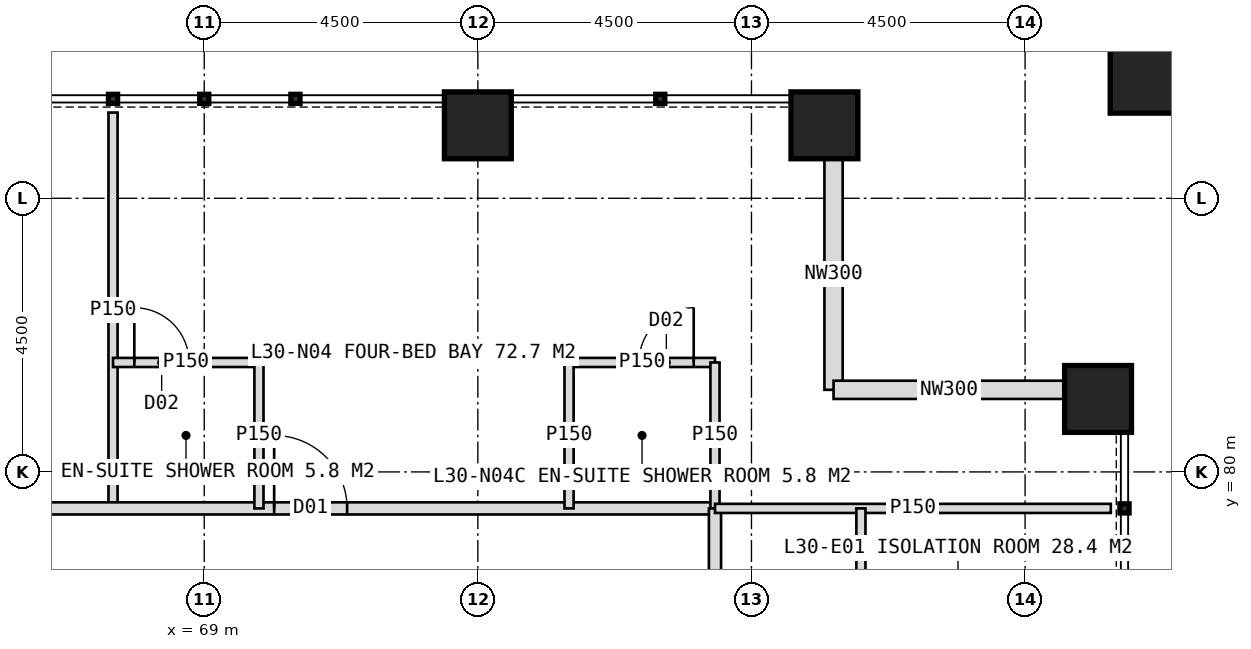
"""IFC4 building model, lengths in metres.
Left out: names, types, materials, properties, quantities, classifications, styles, units other than length and angle.
Written with IfcOpenShell. Run it as: python <this file> out.ifc"""

import sys

from ifc_helpers import new_model, si_unit, direction, frame, frame_2d, origin, origin_2d, place, context, subcontext, project, spatial, rectangle, hollow_rectangle, extrude, element, fill, save


model = new_model("IFC4")
c1 = context("Model", 3, precision=1e-05, world=origin(), true_north=direction((0.0, 1.0)))
c2 = subcontext(c1, "Body", "Model", "MODEL_VIEW")
j1 = project(units=[si_unit("LENGTHUNIT", "METRE"), si_unit("PLANEANGLEUNIT", "RADIAN")], contexts=[c1])
p1 = place(None, origin())
s1 = spatial("IfcSite", under=j1, at=p1, CompositionType="ELEMENT")
p2 = place(p1, origin())
s2 = spatial("IfcBuilding", under=s1, at=p2, CompositionType="ELEMENT")
p3 = place(p2, frame((0.0, 0.0, 128.0)))
s3 = spatial("IfcBuildingStorey", under=s2, at=p3, CompositionType="ELEMENT", Elevation=128.0)
for number, where, z_axis, x_axis in (
    (1, (73.5, 85.7, 0.0), (0.0, 0.0, 1.0), (1.0, 0.0, 0.0)),
    (2, (79.2, 85.7, 0.0), (0.0, 0.0, 1.0), (1.0, 0.0, 0.0)),
    (3, (83.7, 81.2, 0.0), (0.0, 0.0, 1.0), (1.0, 0.0, 0.0)),
):
    element("IfcColumn", number, at=place(p3, frame(where, z_axis=z_axis, x_axis=x_axis)), inside=s3, PredefinedType="COLUMN", context=c2, shape_type="SweptSolid", body=[
        extrude(hollow_rectangle(XDim=1.1, YDim=1.1, WallThickness=0.1, at=origin_2d()), origin(), (0.0, 0.0, 1.0), 4.0),
    ])
p4 = place(p3, frame((84.6, 86.6, 0.0), z_axis=(0.0, 0.0, 1.0), x_axis=(1.0, 0.0, 0.0)))
e4 = element("IfcColumn", 4, at=p4, inside=s3, PredefinedType="COLUMN", context=c2, shape_type="SweptSolid", body=[
    extrude(hollow_rectangle(XDim=1.4, YDim=1.4, WallThickness=0.08, at=origin_2d()), origin(), (0.0, 0.0, 1.0), 4.0),
])
for number, where, z_axis, x_axis in (
    (5, (79.35, 85.15, 0.0), (0.0, 0.0, 1.0), (0.0, -1.0, 0.0)),
    (6, (79.35, 81.35, 0.0), (0.0, 0.0, 1.0), (1.0, 0.0, 0.0)),
):
    element("IfcWall", number, at=place(p3, frame(where, z_axis=z_axis, x_axis=x_axis)), inside=s3, PredefinedType="ELEMENTEDWALL", context=c2, shape_type="SweptSolid", body=[
        extrude(rectangle(XDim=3.8, YDim=0.3, at=frame_2d((1.9, 0.0))), origin(), (0.0, 0.0, 1.0), 4.0),
    ])
p5 = place(p3, frame((67.5, 79.4, 0.0), z_axis=(0.0, 0.0, 1.0), x_axis=(0.0, 1.0, 0.0)))
e7 = element("IfcWall", 7, at=p5, inside=s3, PredefinedType="PARTITIONING", context=c2, shape_type="SweptSolid", body=[
    extrude(rectangle(XDim=6.51, YDim=0.15, at=frame_2d((3.255, 0.0))), origin(), (0.0, 0.0, 1.0), 3.75),
])
p6 = place(p3, frame((42.6, 79.4, 0.0), z_axis=(0.0, 0.0, 1.0), x_axis=(1.0, 0.0, 0.0)))
e8 = element("IfcWall", 8, at=p6, inside=s3, PredefinedType="PARTITIONING", context=c2, shape_type="SweptSolid", body=[
    extrude(rectangle(XDim=34.8, YDim=0.2, at=frame_2d((17.4, 0.0))), origin(), (0.0, 0.0, 1.0), 3.75),
])
p7 = place(p6, frame((2.45, 0.0, 0.0)))
e9 = element("IfcOpeningElement", 9, at=p7, cuts=e8, PredefinedType="OPENING", context=c2, shape_type="SweptSolid", body=[
    extrude(rectangle(XDim=1.2, YDim=2.2, at=frame_2d((0.6, 1.1))), frame((0.0, 0.11, 0.0), z_axis=(0.0, -1.0, 0.0), x_axis=(1.0, 0.0, 0.0)), (0.0, 0.0, 1.0), 0.22),
])
p8 = place(p6, frame((10.15, 0.0, 0.0)))
e10 = element("IfcOpeningElement", 10, at=p8, cuts=e8, PredefinedType="OPENING", context=c2, shape_type="SweptSolid", body=[
    extrude(rectangle(XDim=1.2, YDim=2.2, at=frame_2d((0.6, 1.1))), frame((0.0, 0.11, 0.0), z_axis=(0.0, -1.0, 0.0), x_axis=(1.0, 0.0, 0.0)), (0.0, 0.0, 1.0), 0.22),
])
p9 = place(p6, frame((19.8, 0.0, 0.0)))
e11 = element("IfcOpeningElement", 11, at=p9, cuts=e8, PredefinedType="OPENING", context=c2, shape_type="SweptSolid", body=[
    extrude(rectangle(XDim=1.2, YDim=2.2, at=frame_2d((0.6, 1.1))), frame((0.0, 0.11, 0.0), z_axis=(0.0, -1.0, 0.0), x_axis=(1.0, 0.0, 0.0)), (0.0, 0.0, 1.0), 0.22),
])
p10 = place(p6, frame((27.55, 0.0, 0.0)))
e12 = element("IfcOpeningElement", 12, at=p10, cuts=e8, PredefinedType="OPENING", context=c2, shape_type="SweptSolid", body=[
    extrude(rectangle(XDim=1.2, YDim=2.2, at=frame_2d((0.6, 1.1))), frame((0.0, 0.11, 0.0), z_axis=(0.0, -1.0, 0.0), x_axis=(1.0, 0.0, 0.0)), (0.0, 0.0, 1.0), 0.22),
])
p11 = place(p3, frame((67.5, 81.8, 0.0), z_axis=(0.0, 0.0, 1.0), x_axis=(1.0, 0.0, 0.0)))
e13 = element("IfcWall", 13, at=p11, inside=s3, PredefinedType="PARTITIONING", context=c2, shape_type="SweptSolid", body=[
    extrude(rectangle(XDim=2.4, YDim=0.15, at=frame_2d((1.2, 0.0))), origin(), (0.0, 0.0, 1.0), 3.75),
])
p12 = place(p11, frame((0.35, 0.0, 0.0)))
e14 = element("IfcOpeningElement", 14, at=p12, cuts=e13, PredefinedType="OPENING", context=c2, shape_type="SweptSolid", body=[
    extrude(rectangle(XDim=0.9, YDim=2.1, at=frame_2d((0.45, 1.05))), frame((0.0, 0.085, 0.0), z_axis=(0.0, -1.0, 0.0), x_axis=(1.0, 0.0, 0.0)), (0.0, 0.0, 1.0), 0.17),
])
p13 = place(p3, frame((69.9, 79.4, 0.0), z_axis=(0.0, 0.0, 1.0), x_axis=(0.0, 1.0, 0.0)))
e15 = element("IfcWall", 15, at=p13, inside=s3, PredefinedType="PARTITIONING", context=c2, shape_type="SweptSolid", body=[
    extrude(rectangle(XDim=2.4, YDim=0.15, at=frame_2d((1.2, 0.0))), origin(), (0.0, 0.0, 1.0), 3.75),
])
p14 = place(p3, frame((75.0, 81.8, 0.0), z_axis=(0.0, 0.0, 1.0), x_axis=(1.0, 0.0, 0.0)))
e16 = element("IfcWall", 16, at=p14, inside=s3, PredefinedType="PARTITIONING", context=c2, shape_type="SweptSolid", body=[
    extrude(rectangle(XDim=2.4, YDim=0.15, at=frame_2d((1.2, 0.0))), origin(), (0.0, 0.0, 1.0), 3.75),
])
p15 = place(p14, frame((1.15, 0.0, 0.0)))
e17 = element("IfcOpeningElement", 17, at=p15, cuts=e16, PredefinedType="OPENING", context=c2, shape_type="SweptSolid", body=[
    extrude(rectangle(XDim=0.9, YDim=2.1, at=frame_2d((0.45, 1.05))), frame((0.0, 0.085, 0.0), z_axis=(0.0, -1.0, 0.0), x_axis=(1.0, 0.0, 0.0)), (0.0, 0.0, 1.0), 0.17),
])
for number, where, z_axis, x_axis in (
    (18, (75.0, 79.4, 0.0), (0.0, 0.0, 1.0), (0.0, 1.0, 0.0)),
    (19, (77.4, 79.4, 0.0), (0.0, 0.0, 1.0), (0.0, 1.0, 0.0)),
):
    element("IfcWall", number, at=place(p3, frame(where, z_axis=z_axis, x_axis=x_axis)), inside=s3, PredefinedType="PARTITIONING", context=c2, shape_type="SweptSolid", body=[
        extrude(rectangle(XDim=2.4, YDim=0.15, at=frame_2d((1.2, 0.0))), origin(), (0.0, 0.0, 1.0), 3.75),
    ])
p16 = place(p3, frame((77.4, 79.4, 0.0), z_axis=(0.0, 0.0, 1.0), x_axis=(0.0, -1.0, 0.0)))
e20 = element("IfcWall", 20, at=p16, inside=s3, PredefinedType="PARTITIONING", context=c2, shape_type="SweptSolid", body=[
    extrude(rectangle(XDim=34.8, YDim=0.2, at=frame_2d((17.4, 0.0))), origin(), (0.0, 0.0, 1.0), 3.75),
])
p17 = place(p16, frame((2.45, 0.0, 0.0)))
e21 = element("IfcOpeningElement", 21, at=p17, cuts=e20, PredefinedType="OPENING", context=c2, shape_type="SweptSolid", body=[
    extrude(rectangle(XDim=1.2, YDim=2.2, at=frame_2d((0.6, 1.1))), frame((0.0, 0.11, 0.0), z_axis=(0.0, -1.0, 0.0), x_axis=(1.0, 0.0, 0.0)), (0.0, 0.0, 1.0), 0.22),
])
p18 = place(p16, frame((10.15, 0.0, 0.0)))
e22 = element("IfcOpeningElement", 22, at=p18, cuts=e20, PredefinedType="OPENING", context=c2, shape_type="SweptSolid", body=[
    extrude(rectangle(XDim=1.2, YDim=2.2, at=frame_2d((0.6, 1.1))), frame((0.0, 0.11, 0.0), z_axis=(0.0, -1.0, 0.0), x_axis=(1.0, 0.0, 0.0)), (0.0, 0.0, 1.0), 0.22),
])
p19 = place(p16, frame((19.55, 0.0, 0.0)))
e23 = element("IfcOpeningElement", 23, at=p19, cuts=e20, PredefinedType="OPENING", context=c2, shape_type="SweptSolid", body=[
    extrude(rectangle(XDim=1.2, YDim=2.2, at=frame_2d((0.6, 1.1))), frame((0.0, 0.11, 0.0), z_axis=(0.0, -1.0, 0.0), x_axis=(1.0, 0.0, 0.0)), (0.0, 0.0, 1.0), 0.22),
])
p20 = place(p16, frame((26.05, 0.0, 0.0)))
e24 = element("IfcOpeningElement", 24, at=p20, cuts=e20, PredefinedType="OPENING", context=c2, shape_type="SweptSolid", body=[
    extrude(rectangle(XDim=1.2, YDim=2.2, at=frame_2d((0.6, 1.1))), frame((0.0, 0.11, 0.0), z_axis=(0.0, -1.0, 0.0), x_axis=(1.0, 0.0, 0.0)), (0.0, 0.0, 1.0), 0.22),
])
p21 = place(p3, frame((77.4, 79.4, 0.0), z_axis=(0.0, 0.0, 1.0), x_axis=(1.0, 0.0, 0.0)))
e25 = element("IfcWall", 25, at=p21, inside=s3, PredefinedType="PARTITIONING", context=c2, shape_type="SweptSolid", body=[
    extrude(rectangle(XDim=6.51, YDim=0.15, at=frame_2d((3.255, 0.0))), origin(), (0.0, 0.0, 1.0), 3.75),
])
p22 = place(p3, frame((79.8, 79.4, 0.0), z_axis=(0.0, 0.0, 1.0), x_axis=(0.0, -1.0, 0.0)))
e26 = element("IfcWall", 26, at=p22, inside=s3, PredefinedType="PARTITIONING", context=c2, shape_type="SweptSolid", body=[
    extrude(rectangle(XDim=3.9, YDim=0.15, at=frame_2d((1.95, 0.0))), origin(), (0.0, 0.0, 1.0), 3.75),
])
p23 = place(p22, frame((2.45, 0.0, 0.0)))
e27 = element("IfcOpeningElement", 27, at=p23, cuts=e26, PredefinedType="OPENING", context=c2, shape_type="SweptSolid", body=[
    extrude(rectangle(XDim=1.2, YDim=2.2, at=frame_2d((0.6, 1.1))), frame((0.0, 0.085, 0.0), z_axis=(0.0, -1.0, 0.0), x_axis=(1.0, 0.0, 0.0)), (0.0, 0.0, 1.0), 0.17),
])
p24 = place(p10, origin())
e28 = element("IfcDoor", 28, at=p24, inside=s3, OperationType="SINGLE_SWING_LEFT", PredefinedType="DOOR", context=c2, shape_type="SweptSolid", body=[
    extrude(rectangle(XDim=1.2, YDim=2.2, at=frame_2d((0.6, 1.1))), frame((0.0, 0.025, 0.0), z_axis=(0.0, -1.0, 0.0), x_axis=(1.0, 0.0, 0.0)), (0.0, 0.0, 1.0), 0.05),
])
fill(e12, e28)
p25 = place(p12, origin())
e29 = element("IfcDoor", 29, at=p25, inside=s3, OperationType="SINGLE_SWING_LEFT", PredefinedType="DOOR", context=c2, shape_type="SweptSolid", body=[
    extrude(rectangle(XDim=0.9, YDim=2.1, at=frame_2d((0.45, 1.05))), frame((0.0, 0.025, 0.0), z_axis=(0.0, -1.0, 0.0), x_axis=(1.0, 0.0, 0.0)), (0.0, 0.0, 1.0), 0.05),
])
fill(e14, e29)
p26 = place(p15, origin())
e30 = element("IfcDoor", 30, at=p26, inside=s3, OperationType="SINGLE_SWING_RIGHT", PredefinedType="DOOR", context=c2, shape_type="SweptSolid", body=[
    extrude(rectangle(XDim=0.9, YDim=2.1, at=frame_2d((0.45, 1.05))), frame((0.0, 0.025, 0.0), z_axis=(0.0, -1.0, 0.0), x_axis=(1.0, 0.0, 0.0)), (0.0, 0.0, 1.0), 0.05),
])
fill(e17, e30)
save(model, sys.argv[1])
